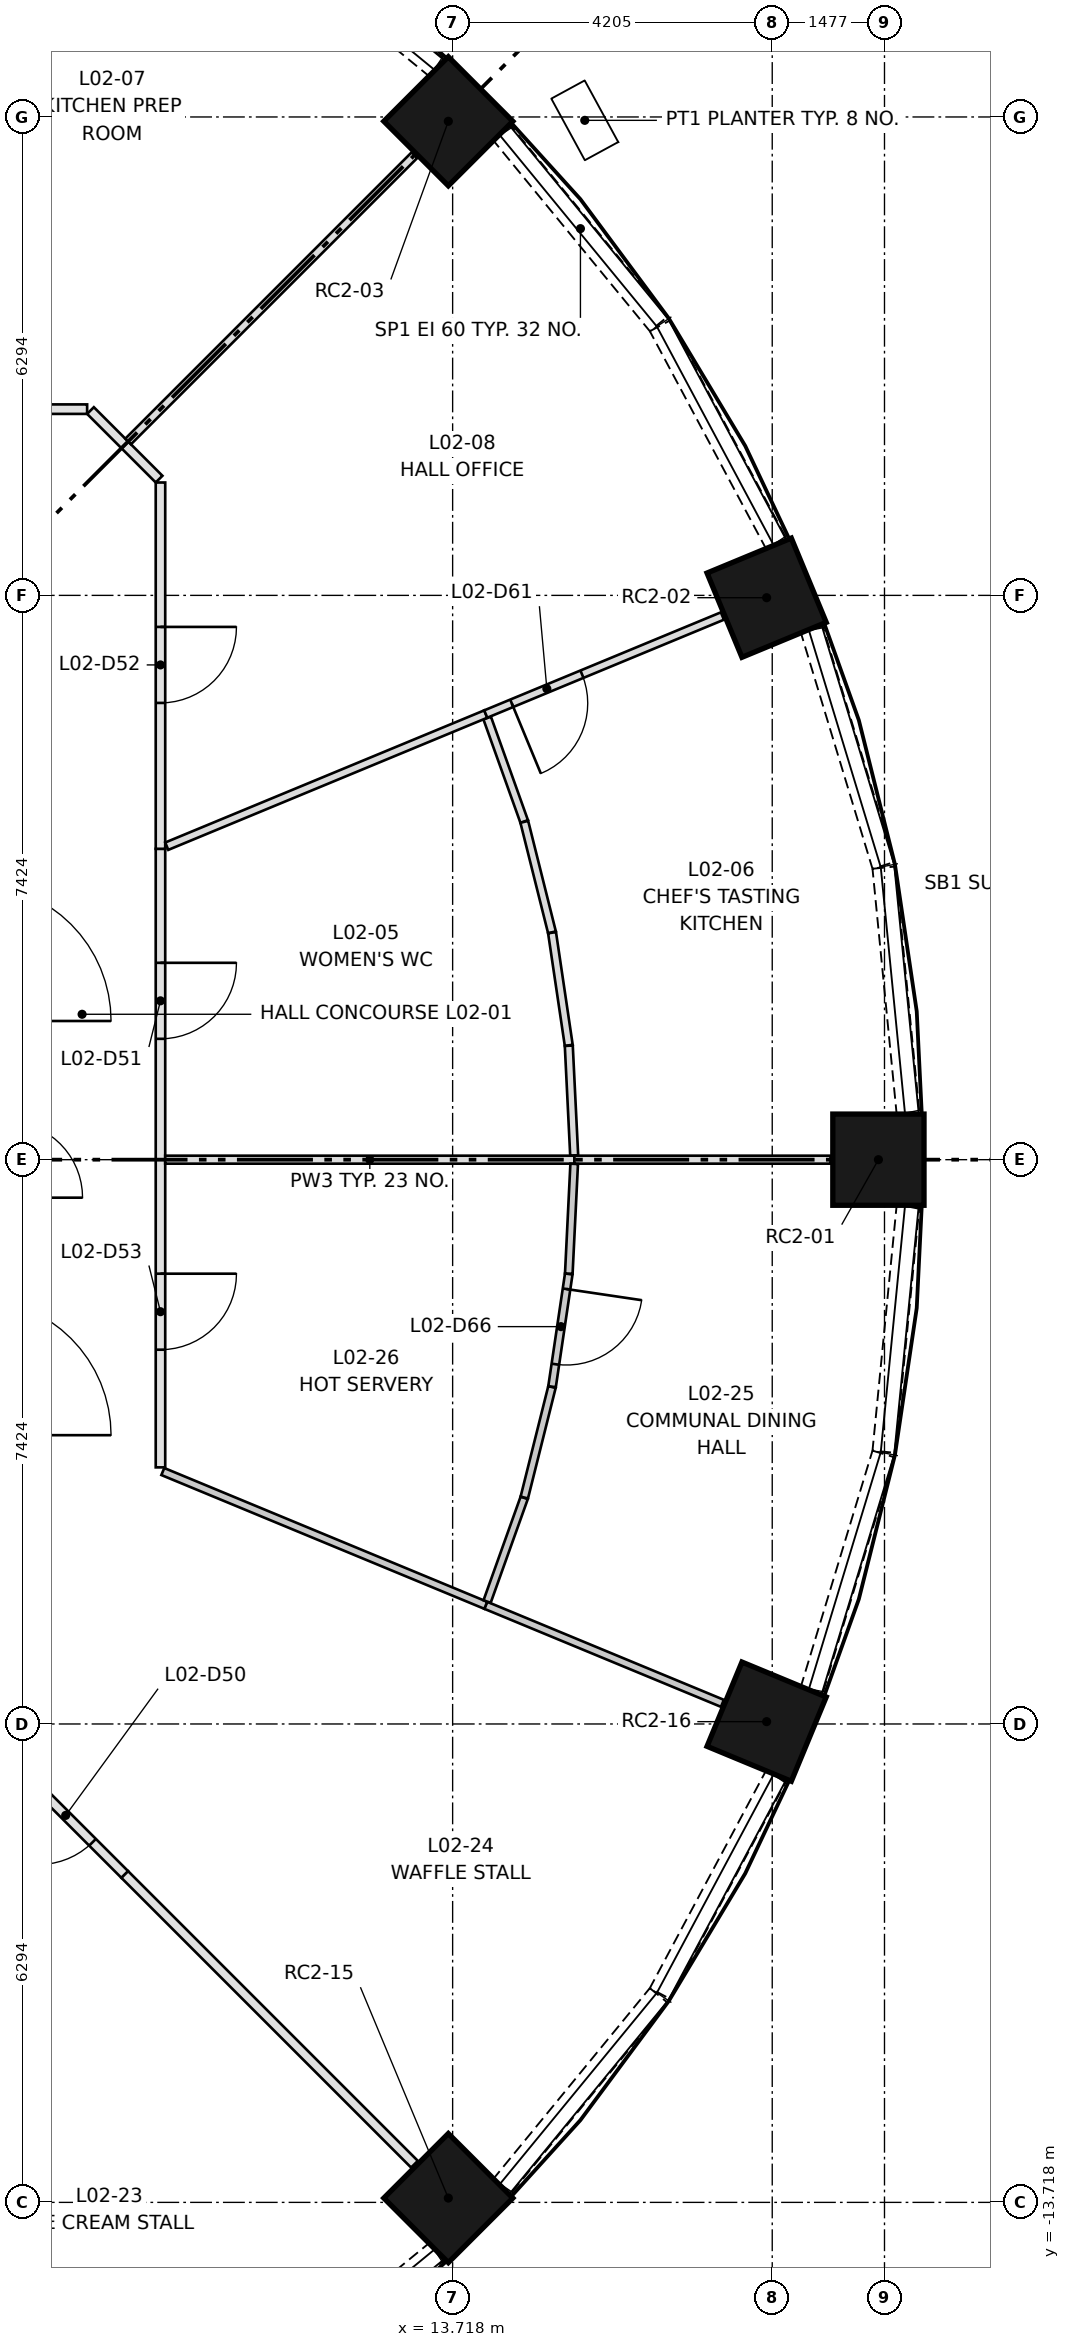
"""IFC4 building model, lengths in metres.
Left out: names, types, materials, properties, quantities, classifications, styles, units other than length and angle.
Written with IfcOpenShell. Run it as: python <this file> out.ifc"""

import sys

from ifc_helpers import new_model, si_unit, direction, frame, frame_2d, origin, origin_2d, place, context, subcontext, project, spatial, rectangle, extrude, element, fill, save


model = new_model("IFC4")
c1 = context("Model", 3, precision=1e-05, world=origin(), true_north=direction((0.0, 1.0)))
c2 = subcontext(c1, "Body", "Model", "MODEL_VIEW")
j1 = project(units=[si_unit("LENGTHUNIT", "METRE"), si_unit("PLANEANGLEUNIT", "RADIAN")], contexts=[c1])
p1 = place(None, origin())
s1 = spatial("IfcSite", under=j1, at=p1, CompositionType="ELEMENT")
p2 = place(p1, origin())
s2 = spatial("IfcBuilding", under=s1, at=p2, CompositionType="ELEMENT")
p3 = place(p2, frame((0.0, 0.0, 9.9)))
s3 = spatial("IfcBuildingStorey", under=s2, at=p3, CompositionType="ELEMENT", Elevation=9.9)
for number, where, z_axis, x_axis in (
    (1, (19.32, 0.0, 0.0), (0.0, 0.0, 1.0), (1.0, 0.0, 0.0)),
    (2, (17.849, 7.394, 0.0), (0.0, 0.0, 1.0), (0.924, 0.383, 0.0)),
    (3, (13.661, 13.661, 0.0), (0.0, 0.0, 1.0), (0.707, 0.707, 0.0)),
    (4, (13.661, -13.661, 0.0), (0.0, 0.0, 1.0), (0.707, -0.707, 0.0)),
    (5, (17.849, -7.394, 0.0), (0.0, 0.0, 1.0), (0.924, -0.383, 0.0)),
):
    element("IfcColumn", number, at=place(p3, frame(where, z_axis=z_axis, x_axis=x_axis)), inside=s3, PredefinedType="COLUMN", context=c2, shape_type="SweptSolid", body=[
        extrude(rectangle(XDim=1.2, YDim=1.2, at=origin_2d()), origin(), (0.0, 0.0, 1.0), 4.5),
    ])
p4 = place(p3, frame((19.709, 0.613, 0.0), z_axis=(0.0, 0.0, 1.0), x_axis=(-0.097961566391, 0.995190198661, 0.0)))
e6 = element("IfcWall", 6, at=p4, inside=s3, PredefinedType="SOLIDWALL", context=c2, shape_type="SweptSolid", body=[
    extrude(rectangle(XDim=3.245, YDim=0.3, at=frame_2d((1.623, 0.0))), origin(), (0.0, 0.0, 1.0), 0.45),
])
p5 = place(p3, frame((19.385, 3.871, 0.0), z_axis=(0.0, 0.0, 1.0), x_axis=(-0.290418848098, 0.95689962518, 0.0)))
e7 = element("IfcWall", 7, at=p5, inside=s3, PredefinedType="SOLIDWALL", context=c2, shape_type="SweptSolid", body=[
    extrude(rectangle(XDim=3.244, YDim=0.3, at=frame_2d((1.622, 0.0))), origin(), (0.0, 0.0, 1.0), 0.45),
])
p6 = place(p3, frame((17.974, 8.108, 0.0), z_axis=(0.0, 0.0, 1.0), x_axis=(-0.471220846392, 0.882015257196, 0.0)))
e8 = element("IfcWall", 8, at=p6, inside=s3, PredefinedType="SOLIDWALL", context=c2, shape_type="SweptSolid", body=[
    extrude(rectangle(XDim=3.244, YDim=0.3, at=frame_2d((1.622, 0.0))), origin(), (0.0, 0.0, 1.0), 0.45),
])
for number, where, z_axis, x_axis in (
    (9, (16.428, 10.995, 0.0), (0.0, 0.0, 1.0), (-0.634, 0.773, 0.0)),
    (10, (13.503, 14.371, 0.0), (0.0, 0.0, 1.0), (-0.773, 0.634, 0.0)),
    (11, (10.995, -16.428, 0.0), (0.0, 0.0, 1.0), (0.773, 0.634, 0.0)),
    (12, (14.371, -13.503, 0.0), (0.0, 0.0, 1.0), (0.634, 0.773, 0.0)),
):
    element("IfcWall", number, at=place(p3, frame(where, z_axis=z_axis, x_axis=x_axis)), inside=s3, PredefinedType="SOLIDWALL", context=c2, shape_type="SweptSolid", body=[
        extrude(rectangle(XDim=3.245, YDim=0.3, at=frame_2d((1.623, 0.0))), origin(), (0.0, 0.0, 1.0), 0.45),
    ])
p7 = place(p3, frame((16.445, -10.97, 0.0), z_axis=(0.0, 0.0, 1.0), x_axis=(0.471220846392, 0.882015257196, 0.0)))
e13 = element("IfcWall", 13, at=p7, inside=s3, PredefinedType="SOLIDWALL", context=c2, shape_type="SweptSolid", body=[
    extrude(rectangle(XDim=3.244, YDim=0.3, at=frame_2d((1.622, 0.0))), origin(), (0.0, 0.0, 1.0), 0.45),
])
p8 = place(p3, frame((18.443, -6.976, 0.0), z_axis=(0.0, 0.0, 1.0), x_axis=(0.290418848098, 0.95689962518, 0.0)))
e14 = element("IfcWall", 14, at=p8, inside=s3, PredefinedType="SOLIDWALL", context=c2, shape_type="SweptSolid", body=[
    extrude(rectangle(XDim=3.244, YDim=0.3, at=frame_2d((1.622, 0.0))), origin(), (0.0, 0.0, 1.0), 0.45),
])
p9 = place(p3, frame((19.392, -3.842, 0.0), z_axis=(0.0, 0.0, 1.0), x_axis=(0.097961566391, 0.995190198661, 0.0)))
e15 = element("IfcWall", 15, at=p9, inside=s3, PredefinedType="SOLIDWALL", context=c2, shape_type="SweptSolid", body=[
    extrude(rectangle(XDim=3.245, YDim=0.3, at=frame_2d((1.623, 0.0))), origin(), (0.0, 0.0, 1.0), 0.45),
])
p10 = place(p3, frame((9.405, -9.405, 0.0), z_axis=(0.0, 0.0, 1.0), x_axis=(-0.707106781187, 0.707106781187, 0.0)))
e16 = element("IfcWall", 16, at=p10, inside=s3, PredefinedType="PARTITIONING", context=c2, shape_type="SweptSolid", body=[
    extrude(rectangle(XDim=2.165, YDim=0.125, at=frame_2d((1.082, 0.0))), origin(), (0.0, 0.0, 1.0), 4.1),
])
p11 = place(p10, frame((0.6, 0.0, 0.0)))
e17 = element("IfcOpeningElement", 17, at=p11, cuts=e16, PredefinedType="OPENING", context=c2, shape_type="SweptSolid", body=[
    extrude(rectangle(XDim=1.0, YDim=2.1, at=frame_2d((0.5, 1.05))), frame((0.0, 0.073, 0.0), z_axis=(0.0, -1.0, 0.0), x_axis=(1.0, 0.0, 0.0)), (0.0, 0.0, 1.0), 0.145),
])
p12 = place(p3, frame((9.874, 4.09, 0.0), z_axis=(0.0, 0.0, 1.0), x_axis=(0.0, -1.0, 0.0)))
e18 = element("IfcWall", 18, at=p12, inside=s3, PredefinedType="PARTITIONING", context=c2, shape_type="SweptSolid", body=[
    extrude(rectangle(XDim=4.09, YDim=0.125, at=frame_2d((2.045, 0.0))), origin(), (0.0, 0.0, 1.0), 4.1),
])
p13 = place(p12, frame((1.5, 0.0, 0.0)))
e19 = element("IfcOpeningElement", 19, at=p13, cuts=e18, PredefinedType="OPENING", context=c2, shape_type="SweptSolid", body=[
    extrude(rectangle(XDim=1.0, YDim=2.1, at=frame_2d((0.5, 1.05))), frame((0.0, 0.073, 0.0), z_axis=(0.0, -1.0, 0.0), x_axis=(1.0, 0.0, 0.0)), (0.0, 0.0, 1.0), 0.145),
])
p14 = place(p3, frame((9.405, 9.405, 0.0), z_axis=(0.0, 0.0, 1.0), x_axis=(0.707106781187, -0.707106781187, 0.0)))
e20 = element("IfcWall", 20, at=p14, inside=s3, PredefinedType="PARTITIONING", context=c2, shape_type="SweptSolid", body=[
    extrude(rectangle(XDim=0.638, YDim=0.125, at=frame_2d((0.319, 0.0))), origin(), (0.0, 0.0, 1.0), 4.1),
])
p15 = place(p3, frame((9.874, 8.909, 0.0), z_axis=(0.0, 0.0, 1.0), x_axis=(0.0, -1.0, 0.0)))
e21 = element("IfcWall", 21, at=p15, inside=s3, PredefinedType="PARTITIONING", context=c2, shape_type="SweptSolid", body=[
    extrude(rectangle(XDim=4.819, YDim=0.125, at=frame_2d((2.41, 0.0))), origin(), (0.0, 0.0, 1.0), 4.1),
])
p16 = place(p15, frame((1.9, 0.0, 0.0)))
e22 = element("IfcOpeningElement", 22, at=p16, cuts=e21, PredefinedType="OPENING", context=c2, shape_type="SweptSolid", body=[
    extrude(rectangle(XDim=1.0, YDim=2.1, at=frame_2d((0.5, 1.05))), frame((0.0, 0.073, 0.0), z_axis=(0.0, -1.0, 0.0), x_axis=(1.0, 0.0, 0.0)), (0.0, 0.0, 1.0), 0.145),
])
p17 = place(p3, frame((9.874, 0.0, 0.0), z_axis=(0.0, 0.0, 1.0), x_axis=(0.0, -1.0, 0.0)))
e23 = element("IfcWall", 23, at=p17, inside=s3, PredefinedType="PARTITIONING", context=c2, shape_type="SweptSolid", body=[
    extrude(rectangle(XDim=4.048, YDim=0.125, at=frame_2d((2.024, 0.0))), origin(), (0.0, 0.0, 1.0), 4.1),
])
p18 = place(p17, frame((1.5, 0.0, 0.0)))
e24 = element("IfcOpeningElement", 24, at=p18, cuts=e23, PredefinedType="OPENING", context=c2, shape_type="SweptSolid", body=[
    extrude(rectangle(XDim=1.0, YDim=2.1, at=frame_2d((0.5, 1.05))), frame((0.0, 0.073, 0.0), z_axis=(0.0, -1.0, 0.0), x_axis=(1.0, 0.0, 0.0)), (0.0, 0.0, 1.0), 0.145),
])
p19 = place(p3, frame((4.09, 9.874, 0.0), z_axis=(0.0, 0.0, 1.0), x_axis=(1.0, 0.0, 0.0)))
e25 = element("IfcWall", 25, at=p19, inside=s3, PredefinedType="PARTITIONING", context=c2, shape_type="SweptSolid", body=[
    extrude(rectangle(XDim=4.819, YDim=0.125, at=frame_2d((2.41, 0.0))), origin(), (0.0, 0.0, 1.0), 4.1),
])
p20 = place(p19, frame((1.9, 0.0, 0.0)))
e26 = element("IfcOpeningElement", 26, at=p20, cuts=e25, PredefinedType="OPENING", context=c2, shape_type="SweptSolid", body=[
    extrude(rectangle(XDim=1.0, YDim=2.1, at=frame_2d((0.5, 1.05))), frame((0.0, 0.073, 0.0), z_axis=(0.0, -1.0, 0.0), x_axis=(1.0, 0.0, 0.0)), (0.0, 0.0, 1.0), 0.145),
])
p21 = place(p3, frame((8.953, 9.856, 0.0), z_axis=(0.0, 0.0, 1.0), x_axis=(0.707106781187, -0.707106781187, 0.0)))
e27 = element("IfcWall", 27, at=p21, inside=s3, PredefinedType="PARTITIONING", context=c2, shape_type="SweptSolid", body=[
    extrude(rectangle(XDim=0.638, YDim=0.125, at=frame_2d((0.319, 0.0))), origin(), (0.0, 0.0, 1.0), 4.1),
])
p22 = place(p3, frame((14.172, 5.811, 0.0), z_axis=(0.0, 0.0, 1.0), x_axis=(0.336924752759, -0.94153157726, 0.0)))
e28 = element("IfcWall", 28, at=p22, inside=s3, PredefinedType="PARTITIONING", context=c2, shape_type="SweptSolid", body=[
    extrude(rectangle(XDim=1.446, YDim=0.105, at=frame_2d((0.723, 0.0))), origin(), (0.0, 0.0, 1.0), 4.1),
])
for number, where, z_axis, x_axis in (
    (29, (14.661, 4.445, 0.0), (0.0, 0.0, 1.0), (0.243, -0.97, 0.0)),
    (30, (15.026, 2.986, 0.0), (0.0, 0.0, 1.0), (0.147, -0.989, 0.0)),
):
    element("IfcWall", number, at=place(p3, frame(where, z_axis=z_axis, x_axis=x_axis)), inside=s3, PredefinedType="PARTITIONING", context=c2, shape_type="SweptSolid", body=[
        extrude(rectangle(XDim=1.498, YDim=0.105, at=frame_2d((0.749, 0.0))), origin(), (0.0, 0.0, 1.0), 4.1),
    ])
p23 = place(p3, frame((15.246, 1.499, 0.0), z_axis=(0.0, 0.0, 1.0), x_axis=(0.049145816664, -0.998791614254, 0.0)))
e31 = element("IfcWall", 31, at=p23, inside=s3, PredefinedType="PARTITIONING", context=c2, shape_type="SweptSolid", body=[
    extrude(rectangle(XDim=1.446, YDim=0.105, at=frame_2d((0.723, 0.0))), origin(), (0.0, 0.0, 1.0), 4.1),
])
p24 = place(p3, frame((9.957, 4.124, 0.0), z_axis=(0.0, 0.0, 1.0), x_axis=(0.92386356406, 0.382721981342, 0.0)))
e32 = element("IfcWall", 32, at=p24, inside=s3, PredefinedType="PARTITIONING", context=c2, shape_type="SweptSolid", body=[
    extrude(rectangle(XDim=4.543, YDim=0.105, at=frame_2d((2.271, 0.0))), origin(), (0.0, 0.0, 1.0), 4.1),
])
p25 = place(p3, frame((15.32, 0.0, 0.0), z_axis=(0.0, 0.0, 1.0), x_axis=(-1.0, 0.0, 0.0)))
e33 = element("IfcWall", 33, at=p25, inside=s3, PredefinedType="PARTITIONING", context=c2, shape_type="SweptSolid", body=[
    extrude(rectangle(XDim=5.384, YDim=0.105, at=frame_2d((2.692, 0.0))), origin(), (0.0, 0.0, 1.0), 4.1),
])
p26 = place(p3, frame((17.267, 7.152, 0.0), z_axis=(0.0, 0.0, 1.0), x_axis=(-0.923891456562, -0.382654643892, 0.0)))
e34 = element("IfcWall", 34, at=p26, inside=s3, PredefinedType="PARTITIONING", context=c2, shape_type="SweptSolid", body=[
    extrude(rectangle(XDim=3.37, YDim=0.105, at=frame_2d((1.685, 0.0))), origin(), (0.0, 0.0, 1.0), 4.1),
])
p27 = place(p26, frame((2.0, 0.0, 0.0)))
e35 = element("IfcOpeningElement", 35, at=p27, cuts=e34, PredefinedType="OPENING", context=c2, shape_type="SweptSolid", body=[
    extrude(rectangle(XDim=1.0, YDim=2.1, at=frame_2d((0.5, 1.05))), frame((0.0, 0.062, 0.0), z_axis=(0.0, -1.0, 0.0), x_axis=(1.0, 0.0, 0.0)), (0.0, 0.0, 1.0), 0.125),
])
p28 = place(p3, frame((18.69, 0.0, 0.0), z_axis=(0.0, 0.0, 1.0), x_axis=(-1.0, 0.0, 0.0)))
e36 = element("IfcWall", 36, at=p28, inside=s3, PredefinedType="PARTITIONING", context=c2, shape_type="SweptSolid", body=[
    extrude(rectangle(XDim=3.37, YDim=0.105, at=frame_2d((1.685, 0.0))), origin(), (0.0, 0.0, 1.0), 4.1),
])
p29 = place(p3, frame((13.216, 13.216, 0.0), z_axis=(0.0, 0.0, 1.0), x_axis=(-0.707106781187, -0.707106781187, 0.0)))
e37 = element("IfcWall", 37, at=p29, inside=s3, PredefinedType="PARTITIONING", context=c2, shape_type="SweptSolid", body=[
    extrude(rectangle(XDim=5.327, YDim=0.105, at=frame_2d((2.664, 0.0))), origin(), (0.0, 0.0, 1.0), 4.1),
])
p30 = place(p3, frame((9.405, -9.405, 0.0), z_axis=(0.0, 0.0, 1.0), x_axis=(0.707106781187, -0.707106781187, 0.0)))
e38 = element("IfcWall", 38, at=p30, inside=s3, PredefinedType="PARTITIONING", context=c2, shape_type="SweptSolid", body=[
    extrude(rectangle(XDim=5.39, YDim=0.125, at=frame_2d((2.695, 0.0))), origin(), (0.0, 0.0, 1.0), 4.1),
])
p31 = place(p3, frame((14.154, -5.863, 0.0), z_axis=(0.0, 0.0, 1.0), x_axis=(0.923891456562, -0.382654643892, 0.0)))
e39 = element("IfcWall", 39, at=p31, inside=s3, PredefinedType="PARTITIONING", context=c2, shape_type="SweptSolid", body=[
    extrude(rectangle(XDim=3.37, YDim=0.1, at=frame_2d((1.685, 0.0))), origin(), (0.0, 0.0, 1.0), 4.1),
])
p32 = place(p3, frame((9.905, -4.103, 0.0), z_axis=(0.0, 0.0, 1.0), x_axis=(0.923879022759, -0.382684663013, 0.0)))
e40 = element("IfcWall", 40, at=p32, inside=s3, PredefinedType="PARTITIONING", context=c2, shape_type="SweptSolid", body=[
    extrude(rectangle(XDim=4.599, YDim=0.1, at=frame_2d((2.3, 0.0))), origin(), (0.0, 0.0, 1.0), 4.1),
])
p33 = place(p3, frame((14.171, -5.813, 0.0), z_axis=(0.0, 0.0, 1.0), x_axis=(0.336934267235, 0.941528172474, 0.0)))
e41 = element("IfcWall", 41, at=p33, inside=s3, PredefinedType="PARTITIONING", context=c2, shape_type="SweptSolid", body=[
    extrude(rectangle(XDim=1.448, YDim=0.1, at=frame_2d((0.724, 0.0))), origin(), (0.0, 0.0, 1.0), 4.1),
])
p34 = place(p3, frame((14.661, -4.445, 0.0), z_axis=(0.0, 0.0, 1.0), x_axis=(0.24291895554, 0.970046587046, 0.0)))
e42 = element("IfcWall", 42, at=p34, inside=s3, PredefinedType="PARTITIONING", context=c2, shape_type="SweptSolid", body=[
    extrude(rectangle(XDim=1.499, YDim=0.1, at=frame_2d((0.749, 0.0))), origin(), (0.0, 0.0, 1.0), 4.1),
])
p35 = place(p3, frame((15.246, -1.504, 0.0), z_axis=(0.0, 0.0, 1.0), x_axis=(-0.146778913129, -0.989169323554, 0.0)))
e43 = element("IfcWall", 43, at=p35, inside=s3, PredefinedType="PARTITIONING", context=c2, shape_type="SweptSolid", body=[
    extrude(rectangle(XDim=1.499, YDim=0.1, at=frame_2d((0.749, 0.0))), origin(), (0.0, 0.0, 1.0), 4.1),
])
p36 = place(p35, frame((0.2, 0.0, 0.0)))
e44 = element("IfcOpeningElement", 44, at=p36, cuts=e43, PredefinedType="OPENING", context=c2, shape_type="SweptSolid", body=[
    extrude(rectangle(XDim=1.0, YDim=2.1, at=frame_2d((0.5, 1.05))), frame((0.0, 0.06, 0.0), z_axis=(0.0, -1.0, 0.0), x_axis=(1.0, 0.0, 0.0)), (0.0, 0.0, 1.0), 0.12),
])
p37 = place(p3, frame((15.246, -1.499, 0.0), z_axis=(0.0, 0.0, 1.0), x_axis=(0.049137528051, 0.998792022063, 0.0)))
e45 = element("IfcWall", 45, at=p37, inside=s3, PredefinedType="PARTITIONING", context=c2, shape_type="SweptSolid", body=[
    extrude(rectangle(XDim=1.446, YDim=0.1, at=frame_2d((0.723, 0.0))), origin(), (0.0, 0.0, 1.0), 4.1),
])
p38 = place(p11, origin())
e46 = element("IfcDoor", 46, at=p38, inside=s3, OperationType="SINGLE_SWING_RIGHT", PredefinedType="DOOR", context=c2, shape_type="SweptSolid", body=[
    extrude(rectangle(XDim=1.0, YDim=2.1, at=frame_2d((0.5, 1.05))), frame((0.0, 0.025, 0.0), z_axis=(0.0, -1.0, 0.0), x_axis=(1.0, 0.0, 0.0)), (0.0, 0.0, 1.0), 0.05),
])
fill(e17, e46)
p39 = place(p13, origin())
e47 = element("IfcDoor", 47, at=p39, inside=s3, OperationType="SINGLE_SWING_LEFT", PredefinedType="DOOR", context=c2, shape_type="SweptSolid", body=[
    extrude(rectangle(XDim=1.0, YDim=2.1, at=frame_2d((0.5, 1.05))), frame((0.0, 0.025, 0.0), z_axis=(0.0, -1.0, 0.0), x_axis=(1.0, 0.0, 0.0)), (0.0, 0.0, 1.0), 0.05),
])
fill(e19, e47)
p40 = place(p16, origin())
e48 = element("IfcDoor", 48, at=p40, inside=s3, OperationType="SINGLE_SWING_LEFT", PredefinedType="DOOR", context=c2, shape_type="SweptSolid", body=[
    extrude(rectangle(XDim=1.0, YDim=2.1, at=frame_2d((0.5, 1.05))), frame((0.0, 0.025, 0.0), z_axis=(0.0, -1.0, 0.0), x_axis=(1.0, 0.0, 0.0)), (0.0, 0.0, 1.0), 0.05),
])
fill(e22, e48)
p41 = place(p18, origin())
e49 = element("IfcDoor", 49, at=p41, inside=s3, OperationType="SINGLE_SWING_LEFT", PredefinedType="DOOR", context=c2, shape_type="SweptSolid", body=[
    extrude(rectangle(XDim=1.0, YDim=2.1, at=frame_2d((0.5, 1.05))), frame((0.0, 0.025, 0.0), z_axis=(0.0, -1.0, 0.0), x_axis=(1.0, 0.0, 0.0)), (0.0, 0.0, 1.0), 0.05),
])
fill(e24, e49)
p42 = place(p27, origin())
e50 = element("IfcDoor", 50, at=p42, inside=s3, OperationType="SINGLE_SWING_RIGHT", PredefinedType="DOOR", context=c2, shape_type="SweptSolid", body=[
    extrude(rectangle(XDim=1.0, YDim=2.1, at=frame_2d((0.5, 1.05))), frame((0.0, 0.025, 0.0), z_axis=(0.0, -1.0, 0.0), x_axis=(1.0, 0.0, 0.0)), (0.0, 0.0, 1.0), 0.05),
])
fill(e35, e50)
p43 = place(p36, origin())
e51 = element("IfcDoor", 51, at=p43, inside=s3, OperationType="SINGLE_SWING_LEFT", PredefinedType="DOOR", context=c2, shape_type="SweptSolid", body=[
    extrude(rectangle(XDim=1.0, YDim=2.1, at=frame_2d((0.5, 1.05))), frame((0.0, 0.025, 0.0), z_axis=(0.0, -1.0, 0.0), x_axis=(1.0, 0.0, 0.0)), (0.0, 0.0, 1.0), 0.05),
])
fill(e44, e51)
save(model, sys.argv[1])
